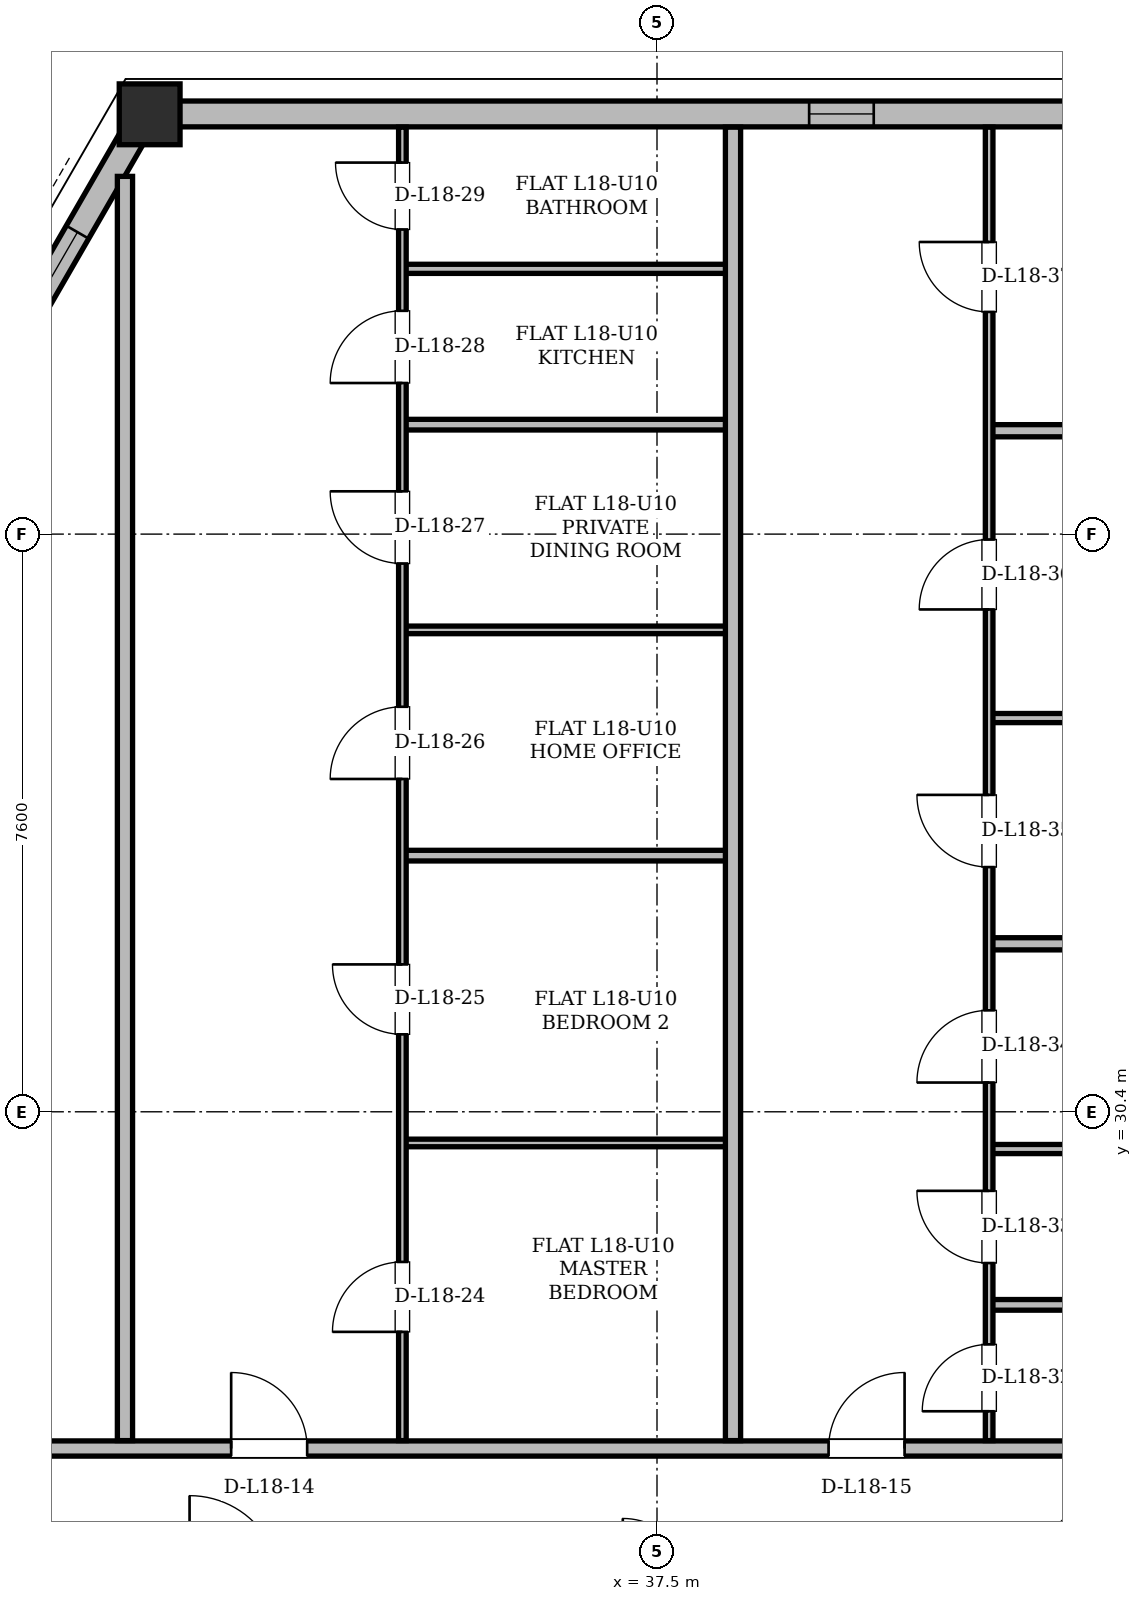
"""IFC4 building model, lengths in metres.
Left out: names, types, materials, properties, quantities, classifications, styles, units other than length and angle.
Written with IfcOpenShell. Run it as: python <this file> out.ifc"""

import sys

from ifc_helpers import new_model, si_unit, direction, frame, frame_2d, origin, origin_2d, place, context, subcontext, project, spatial, rectangle, hollow_rectangle, extrude, element, fill, save


model = new_model("IFC4")
c1 = context("Model", 3, precision=1e-05, world=origin(), true_north=direction((0.0, 1.0)))
c2 = subcontext(c1, "Body", "Model", "MODEL_VIEW")
j1 = project(units=[si_unit("LENGTHUNIT", "METRE"), si_unit("PLANEANGLEUNIT", "RADIAN")], contexts=[c1])
p1 = place(None, origin())
s1 = spatial("IfcSite", under=j1, at=p1, CompositionType="ELEMENT")
p2 = place(p1, origin())
s2 = spatial("IfcBuilding", under=s1, at=p2, CompositionType="ELEMENT")
p3 = place(p2, frame((0.0, 0.0, 70.5)))
s3 = spatial("IfcBuildingStorey", under=s2, at=p3, CompositionType="ELEMENT", Elevation=70.5)
p4 = place(p3, frame((30.773, 43.528, 0.004), z_axis=(0.028678016801, -0.002650338046, 0.999585187496), x_axis=(0.092024908784, 0.995756705307, 0.0)))
e1 = element("IfcColumn", 1, at=p4, inside=s3, PredefinedType="COLUMN", context=c2, shape_type="SweptSolid", body=[
    extrude(hollow_rectangle(XDim=0.8, YDim=0.8, WallThickness=0.065, at=origin_2d()), origin(), (0.0, 0.0, 1.0), 3.593),
])
p5 = place(p3, frame((44.227, 43.528, 0.0), z_axis=(0.0, 0.0, 1.0), x_axis=(-1.0, 0.0, 0.0)))
e2 = element("IfcWall", 2, at=p5, inside=s3, PredefinedType="SOLIDWALL", context=c2, shape_type="SweptSolid", body=[
    extrude(rectangle(XDim=13.454, YDim=0.34, at=frame_2d((6.727, 0.0))), origin(), (0.0, 0.0, 1.0), 2.494),
])
p6 = place(p5, frame((3.875, 0.0, 0.52)))
e3 = element("IfcOpeningElement", 3, at=p6, cuts=e2, PredefinedType="OPENING", context=c2, shape_type="SweptSolid", body=[
    extrude(rectangle(XDim=0.85, YDim=0.92, at=frame_2d((0.425, 0.46))), frame((0.0, 0.17, 0.0), z_axis=(0.0, -1.0, 0.0), x_axis=(1.0, 0.0, 0.0)), (0.0, 0.0, 1.0), 0.34),
])
p7 = place(p3, frame((30.773, 43.528, 0.0), z_axis=(0.0, 0.0, 1.0), x_axis=(-0.499999987774, -0.866025410843, 0.0)))
e4 = element("IfcWall", 4, at=p7, inside=s3, PredefinedType="SOLIDWALL", context=c2, shape_type="SweptSolid", body=[
    extrude(rectangle(XDim=14.976, YDim=0.34, at=frame_2d((7.488, 0.0))), origin(), (0.0, 0.0, 1.0), 2.494),
])
p8 = place(p7, frame((6.369, 0.0, 0.0)))
e5 = element("IfcOpeningElement", 5, at=p8, cuts=e4, PredefinedType="OPENING", context=c2, shape_type="SweptSolid", body=[
    extrude(rectangle(XDim=1.5, YDim=2.2, at=frame_2d((0.75, 1.1))), frame((0.0, 0.17, 0.0), z_axis=(0.0, -1.0, 0.0), x_axis=(1.0, 0.0, 0.0)), (0.0, 0.0, 1.0), 0.34),
])
p9 = place(p7, frame((3.269, 0.0, 0.85)))
e6 = element("IfcOpeningElement", 6, at=p9, cuts=e4, PredefinedType="OPENING", context=c2, shape_type="SweptSolid", body=[
    extrude(rectangle(XDim=1.2, YDim=1.48, at=frame_2d((0.6, 0.74))), frame((0.0, 0.17, 0.0), z_axis=(0.0, -1.0, 0.0), x_axis=(1.0, 0.0, 0.0)), (0.0, 0.0, 1.0), 0.34),
])
p10 = place(p7, frame((11.352, 0.0, 0.85)))
e7 = element("IfcOpeningElement", 7, at=p10, cuts=e4, PredefinedType="OPENING", context=c2, shape_type="SweptSolid", body=[
    extrude(rectangle(XDim=1.2, YDim=1.48, at=frame_2d((0.6, 0.74))), frame((0.0, 0.17, 0.0), z_axis=(0.0, -1.0, 0.0), x_axis=(1.0, 0.0, 0.0)), (0.0, 0.0, 1.0), 0.34),
])
p11 = place(p7, frame((1.796, 0.0, 0.85)))
e8 = element("IfcOpeningElement", 8, at=p11, cuts=e4, PredefinedType="OPENING", context=c2, shape_type="SweptSolid", body=[
    extrude(rectangle(XDim=1.2, YDim=1.48, at=frame_2d((0.6, 0.74))), frame((0.0, 0.17, 0.0), z_axis=(0.0, -1.0, 0.0), x_axis=(1.0, 0.0, 0.0)), (0.0, 0.0, 1.0), 0.34),
])
p12 = place(p3, frame((27.55, 25.97, 0.0), z_axis=(0.0, 0.0, 1.0), x_axis=(1.0, 0.0, 0.0)))
e9 = element("IfcWall", 9, at=p12, inside=s3, PredefinedType="PARTITIONING", context=c2, shape_type="SweptSolid", body=[
    extrude(rectangle(XDim=19.9, YDim=0.2, at=frame_2d((9.95, 0.0))), origin(), (0.0, 0.0, 1.0), 2.738),
])
p13 = place(p12, frame((0.425, 0.0, 0.0)))
e10 = element("IfcOpeningElement", 10, at=p13, cuts=e9, PredefinedType="OPENING", context=c2, shape_type="SweptSolid", body=[
    extrude(rectangle(XDim=1.0, YDim=2.18, at=frame_2d((0.5, 1.09))), frame((0.0, 0.1, 0.0), z_axis=(0.0, -1.0, 0.0), x_axis=(1.0, 0.0, 0.0)), (0.0, 0.0, 1.0), 0.2),
])
p14 = place(p12, frame((4.347, 0.0, 0.0)))
e11 = element("IfcOpeningElement", 11, at=p14, cuts=e9, PredefinedType="OPENING", context=c2, shape_type="SweptSolid", body=[
    extrude(rectangle(XDim=1.0, YDim=2.18, at=frame_2d((0.5, 1.09))), frame((0.0, 0.1, 0.0), z_axis=(0.0, -1.0, 0.0), x_axis=(1.0, 0.0, 0.0)), (0.0, 0.0, 1.0), 0.2),
])
p15 = place(p12, frame((12.208, 0.0, 0.0)))
e12 = element("IfcOpeningElement", 12, at=p15, cuts=e9, PredefinedType="OPENING", context=c2, shape_type="SweptSolid", body=[
    extrude(rectangle(XDim=1.0, YDim=2.18, at=frame_2d((0.5, 1.09))), frame((0.0, 0.1, 0.0), z_axis=(0.0, -1.0, 0.0), x_axis=(1.0, 0.0, 0.0)), (0.0, 0.0, 1.0), 0.2),
])
p16 = place(p3, frame((41.87, 27.86, 0.0), z_axis=(0.0, 0.0, 1.0), x_axis=(1.0, 0.0, 0.0)))
e13 = element("IfcWall", 13, at=p16, inside=s3, PredefinedType="PARTITIONING", context=c2, shape_type="SweptSolid", body=[
    extrude(rectangle(XDim=4.38, YDim=0.14, at=frame_2d((2.19, 0.0))), origin(), (0.0, 0.0, 1.0), 2.738),
])
p17 = place(p3, frame((41.87, 29.91, 0.0), z_axis=(0.0, 0.0, 1.0), x_axis=(1.0, 0.0, 0.0)))
e14 = element("IfcWall", 14, at=p17, inside=s3, PredefinedType="PARTITIONING", context=c2, shape_type="SweptSolid", body=[
    extrude(rectangle(XDim=4.38, YDim=0.12, at=frame_2d((2.19, 0.0))), origin(), (0.0, 0.0, 1.0), 2.738),
])
p18 = place(p3, frame((34.15, 29.99, 0.0), z_axis=(0.0, 0.0, 1.0), x_axis=(1.0, 0.0, 0.0)))
e15 = element("IfcWall", 15, at=p18, inside=s3, PredefinedType="PARTITIONING", context=c2, shape_type="SweptSolid", body=[
    extrude(rectangle(XDim=4.4, YDim=0.1, at=frame_2d((2.2, 0.0))), origin(), (0.0, 0.0, 1.0), 3.36),
])
p19 = place(p3, frame((41.87, 32.61, 0.0), z_axis=(0.0, 0.0, 1.0), x_axis=(1.0, 0.0, 0.0)))
e16 = element("IfcWall", 16, at=p19, inside=s3, PredefinedType="PARTITIONING", context=c2, shape_type="SweptSolid", body=[
    extrude(rectangle(XDim=4.38, YDim=0.16, at=frame_2d((2.19, 0.0))), origin(), (0.0, 0.0, 1.0), 2.738),
])
p20 = place(p3, frame((34.15, 33.77, 0.0), z_axis=(0.0, 0.0, 1.0), x_axis=(1.0, 0.0, 0.0)))
e17 = element("IfcWall", 17, at=p20, inside=s3, PredefinedType="PARTITIONING", context=c2, shape_type="SweptSolid", body=[
    extrude(rectangle(XDim=4.4, YDim=0.14, at=frame_2d((2.2, 0.0))), origin(), (0.0, 0.0, 1.0), 3.36),
])
p21 = place(p3, frame((41.87, 35.58, 0.0), z_axis=(0.0, 0.0, 1.0), x_axis=(1.0, 0.0, 0.0)))
e18 = element("IfcWall", 18, at=p21, inside=s3, PredefinedType="PARTITIONING", context=c2, shape_type="SweptSolid", body=[
    extrude(rectangle(XDim=4.38, YDim=0.12, at=frame_2d((2.19, 0.0))), origin(), (0.0, 0.0, 1.0), 2.738),
])
p22 = place(p3, frame((34.15, 36.74, 0.0), z_axis=(0.0, 0.0, 1.0), x_axis=(1.0, 0.0, 0.0)))
e19 = element("IfcWall", 19, at=p22, inside=s3, PredefinedType="PARTITIONING", context=c2, shape_type="SweptSolid", body=[
    extrude(rectangle(XDim=4.4, YDim=0.1, at=frame_2d((2.2, 0.0))), origin(), (0.0, 0.0, 1.0), 3.36),
])
p23 = place(p3, frame((41.87, 39.36, 0.0), z_axis=(0.0, 0.0, 1.0), x_axis=(1.0, 0.0, 0.0)))
e20 = element("IfcWall", 20, at=p23, inside=s3, PredefinedType="PARTITIONING", context=c2, shape_type="SweptSolid", body=[
    extrude(rectangle(XDim=4.38, YDim=0.16, at=frame_2d((2.19, 0.0))), origin(), (0.0, 0.0, 1.0), 2.738),
])
p24 = place(p3, frame((34.15, 39.44, 0.0), z_axis=(0.0, 0.0, 1.0), x_axis=(1.0, 0.0, 0.0)))
e21 = element("IfcWall", 21, at=p24, inside=s3, PredefinedType="PARTITIONING", context=c2, shape_type="SweptSolid", body=[
    extrude(rectangle(XDim=4.4, YDim=0.14, at=frame_2d((2.2, 0.0))), origin(), (0.0, 0.0, 1.0), 3.36),
])
p25 = place(p3, frame((34.15, 41.49, 0.0), z_axis=(0.0, 0.0, 1.0), x_axis=(1.0, 0.0, 0.0)))
e22 = element("IfcWall", 22, at=p25, inside=s3, PredefinedType="PARTITIONING", context=c2, shape_type="SweptSolid", body=[
    extrude(rectangle(XDim=4.4, YDim=0.12, at=frame_2d((2.2, 0.0))), origin(), (0.0, 0.0, 1.0), 3.36),
])
p26 = place(p3, frame((30.5, 26.074, 0.0), z_axis=(0.0, 0.0, 1.0), x_axis=(0.0, 1.0, 0.0)))
e23 = element("IfcWall", 23, at=p26, inside=s3, PredefinedType="PARTITIONING", context=c2, shape_type="SweptSolid", body=[
    extrude(rectangle(XDim=16.632, YDim=0.2, at=frame_2d((8.316, 0.0))), origin(), (0.0, 0.0, 1.0), 2.494),
])
p27 = place(p3, frame((34.15, 26.074, 0.0), z_axis=(0.0, 0.0, 1.0), x_axis=(0.0, 1.0, 0.0)))
e24 = element("IfcWall", 24, at=p27, inside=s3, PredefinedType="PARTITIONING", context=c2, shape_type="SweptSolid", body=[
    extrude(rectangle(XDim=17.28, YDim=0.1, at=frame_2d((8.64, 0.0))), origin(), (0.0, 0.0, 1.0), 3.36),
])
p28 = place(p27, frame((1.431, 0.0, 0.0)))
e25 = element("IfcOpeningElement", 25, at=p28, cuts=e24, PredefinedType="OPENING", context=c2, shape_type="SweptSolid", body=[
    extrude(rectangle(XDim=0.92, YDim=2.12, at=frame_2d((0.46, 1.06))), frame((0.0, 0.05, 0.0), z_axis=(0.0, -1.0, 0.0), x_axis=(1.0, 0.0, 0.0)), (0.0, 0.0, 1.0), 0.1),
])
p29 = place(p27, frame((5.345, 0.0, 0.0)))
e26 = element("IfcOpeningElement", 26, at=p29, cuts=e24, PredefinedType="OPENING", context=c2, shape_type="SweptSolid", body=[
    extrude(rectangle(XDim=0.92, YDim=2.12, at=frame_2d((0.46, 1.06))), frame((0.0, 0.05, 0.0), z_axis=(0.0, -1.0, 0.0), x_axis=(1.0, 0.0, 0.0)), (0.0, 0.0, 1.0), 0.1),
])
p30 = place(p27, frame((8.705, 0.0, 0.0)))
e27 = element("IfcOpeningElement", 27, at=p30, cuts=e24, PredefinedType="OPENING", context=c2, shape_type="SweptSolid", body=[
    extrude(rectangle(XDim=0.95, YDim=2.1, at=frame_2d((0.475, 1.05))), frame((0.0, 0.05, 0.0), z_axis=(0.0, -1.0, 0.0), x_axis=(1.0, 0.0, 0.0)), (0.0, 0.0, 1.0), 0.1),
])
p31 = place(p27, frame((11.539, 0.0, 0.0)))
e28 = element("IfcOpeningElement", 28, at=p31, cuts=e24, PredefinedType="OPENING", context=c2, shape_type="SweptSolid", body=[
    extrude(rectangle(XDim=0.95, YDim=2.1, at=frame_2d((0.475, 1.05))), frame((0.0, 0.05, 0.0), z_axis=(0.0, -1.0, 0.0), x_axis=(1.0, 0.0, 0.0)), (0.0, 0.0, 1.0), 0.1),
])
p32 = place(p27, frame((13.914, 0.0, 0.0)))
e29 = element("IfcOpeningElement", 29, at=p32, cuts=e24, PredefinedType="OPENING", context=c2, shape_type="SweptSolid", body=[
    extrude(rectangle(XDim=0.95, YDim=2.1, at=frame_2d((0.475, 1.05))), frame((0.0, 0.05, 0.0), z_axis=(0.0, -1.0, 0.0), x_axis=(1.0, 0.0, 0.0)), (0.0, 0.0, 1.0), 0.1),
])
p33 = place(p27, frame((15.934, 0.0, 0.0)))
e30 = element("IfcOpeningElement", 30, at=p33, cuts=e24, PredefinedType="OPENING", context=c2, shape_type="SweptSolid", body=[
    extrude(rectangle(XDim=0.88, YDim=2.08, at=frame_2d((0.44, 1.04))), frame((0.0, 0.05, 0.0), z_axis=(0.0, -1.0, 0.0), x_axis=(1.0, 0.0, 0.0)), (0.0, 0.0, 1.0), 0.1),
])
p34 = place(p3, frame((38.5, 26.074, 0.0), z_axis=(0.0, 0.0, 1.0), x_axis=(0.0, 1.0, 0.0)))
e31 = element("IfcWall", 31, at=p34, inside=s3, PredefinedType="PARTITIONING", context=c2, shape_type="SweptSolid", body=[
    extrude(rectangle(XDim=17.28, YDim=0.2, at=frame_2d((8.64, 0.0))), origin(), (0.0, 0.0, 1.0), 3.36),
])
p35 = place(p3, frame((41.87, 26.074, 0.0), z_axis=(0.0, 0.0, 1.0), x_axis=(0.0, 1.0, 0.0)))
e32 = element("IfcWall", 32, at=p35, inside=s3, PredefinedType="PARTITIONING", context=c2, shape_type="SweptSolid", body=[
    extrude(rectangle(XDim=17.28, YDim=0.1, at=frame_2d((8.64, 0.0))), origin(), (0.0, 0.0, 1.0), 3.36),
])
p36 = place(p35, frame((0.386, 0.0, 0.0)))
e33 = element("IfcOpeningElement", 33, at=p36, cuts=e32, PredefinedType="OPENING", context=c2, shape_type="SweptSolid", body=[
    extrude(rectangle(XDim=0.88, YDim=2.08, at=frame_2d((0.44, 1.04))), frame((0.0, 0.05, 0.0), z_axis=(0.0, -1.0, 0.0), x_axis=(1.0, 0.0, 0.0)), (0.0, 0.0, 1.0), 0.1),
])
p37 = place(p35, frame((2.336, 0.0, 0.0)))
e34 = element("IfcOpeningElement", 34, at=p37, cuts=e32, PredefinedType="OPENING", context=c2, shape_type="SweptSolid", body=[
    extrude(rectangle(XDim=0.95, YDim=2.1, at=frame_2d((0.475, 1.05))), frame((0.0, 0.05, 0.0), z_axis=(0.0, -1.0, 0.0), x_axis=(1.0, 0.0, 0.0)), (0.0, 0.0, 1.0), 0.1),
])
p38 = place(p35, frame((4.711, 0.0, 0.0)))
e35 = element("IfcOpeningElement", 35, at=p38, cuts=e32, PredefinedType="OPENING", context=c2, shape_type="SweptSolid", body=[
    extrude(rectangle(XDim=0.95, YDim=2.1, at=frame_2d((0.475, 1.05))), frame((0.0, 0.05, 0.0), z_axis=(0.0, -1.0, 0.0), x_axis=(1.0, 0.0, 0.0)), (0.0, 0.0, 1.0), 0.1),
])
p39 = place(p35, frame((7.545, 0.0, 0.0)))
e36 = element("IfcOpeningElement", 36, at=p39, cuts=e32, PredefinedType="OPENING", context=c2, shape_type="SweptSolid", body=[
    extrude(rectangle(XDim=0.95, YDim=2.1, at=frame_2d((0.475, 1.05))), frame((0.0, 0.05, 0.0), z_axis=(0.0, -1.0, 0.0), x_axis=(1.0, 0.0, 0.0)), (0.0, 0.0, 1.0), 0.1),
])
p40 = place(p35, frame((10.935, 0.0, 0.0)))
e37 = element("IfcOpeningElement", 37, at=p40, cuts=e32, PredefinedType="OPENING", context=c2, shape_type="SweptSolid", body=[
    extrude(rectangle(XDim=0.92, YDim=2.12, at=frame_2d((0.46, 1.06))), frame((0.0, 0.05, 0.0), z_axis=(0.0, -1.0, 0.0), x_axis=(1.0, 0.0, 0.0)), (0.0, 0.0, 1.0), 0.1),
])
p41 = place(p35, frame((14.849, 0.0, 0.0)))
e38 = element("IfcOpeningElement", 38, at=p41, cuts=e32, PredefinedType="OPENING", context=c2, shape_type="SweptSolid", body=[
    extrude(rectangle(XDim=0.92, YDim=2.12, at=frame_2d((0.46, 1.06))), frame((0.0, 0.05, 0.0), z_axis=(0.0, -1.0, 0.0), x_axis=(1.0, 0.0, 0.0)), (0.0, 0.0, 1.0), 0.1),
])
p42 = place(p11, origin())
e39 = element("IfcWindow", 39, at=p42, inside=s3, PartitioningType="SINGLE_PANEL", PredefinedType="WINDOW", context=c2, shape_type="SweptSolid", body=[
    extrude(rectangle(XDim=1.2, YDim=1.48, at=frame_2d((0.6, 0.74))), frame((0.0, 0.03, 0.0), z_axis=(0.0, -1.0, 0.0), x_axis=(1.0, 0.0, 0.0)), (0.0, 0.0, 1.0), 0.06),
])
fill(e8, e39)
p43 = place(p6, origin())
e40 = element("IfcWindow", 40, at=p43, inside=s3, PartitioningType="SINGLE_PANEL", PredefinedType="WINDOW", context=c2, shape_type="SweptSolid", body=[
    extrude(rectangle(XDim=0.85, YDim=0.92, at=frame_2d((0.425, 0.46))), frame((0.0, 0.03, 0.0), z_axis=(0.0, -1.0, 0.0), x_axis=(1.0, 0.0, 0.0)), (0.0, 0.0, 1.0), 0.06),
])
fill(e3, e40)
p44 = place(p14, origin())
e41 = element("IfcDoor", 41, at=p44, inside=s3, OperationType="SINGLE_SWING_LEFT", PredefinedType="DOOR", context=c2, shape_type="SweptSolid", body=[
    extrude(rectangle(XDim=1.0, YDim=2.18, at=frame_2d((0.5, 1.09))), frame((0.0, 0.025, 0.0), z_axis=(0.0, -1.0, 0.0), x_axis=(1.0, 0.0, 0.0)), (0.0, 0.0, 1.0), 0.05),
])
fill(e11, e41)
p45 = place(p15, origin())
e42 = element("IfcDoor", 42, at=p45, inside=s3, OperationType="SINGLE_SWING_RIGHT", PredefinedType="DOOR", context=c2, shape_type="SweptSolid", body=[
    extrude(rectangle(XDim=1.0, YDim=2.18, at=frame_2d((0.5, 1.09))), frame((0.0, 0.025, 0.0), z_axis=(0.0, -1.0, 0.0), x_axis=(1.0, 0.0, 0.0)), (0.0, 0.0, 1.0), 0.05),
])
fill(e12, e42)
p46 = place(p28, origin())
e43 = element("IfcDoor", 43, at=p46, inside=s3, OperationType="SINGLE_SWING_LEFT", PredefinedType="DOOR", context=c2, shape_type="SweptSolid", body=[
    extrude(rectangle(XDim=0.92, YDim=2.12, at=frame_2d((0.46, 1.06))), frame((0.0, 0.025, 0.0), z_axis=(0.0, -1.0, 0.0), x_axis=(1.0, 0.0, 0.0)), (0.0, 0.0, 1.0), 0.05),
])
fill(e25, e43)
p47 = place(p29, origin())
e44 = element("IfcDoor", 44, at=p47, inside=s3, OperationType="SINGLE_SWING_RIGHT", PredefinedType="DOOR", context=c2, shape_type="SweptSolid", body=[
    extrude(rectangle(XDim=0.92, YDim=2.12, at=frame_2d((0.46, 1.06))), frame((0.0, 0.025, 0.0), z_axis=(0.0, -1.0, 0.0), x_axis=(1.0, 0.0, 0.0)), (0.0, 0.0, 1.0), 0.05),
])
fill(e26, e44)
p48 = place(p30, origin())
e45 = element("IfcDoor", 45, at=p48, inside=s3, OperationType="SINGLE_SWING_LEFT", PredefinedType="DOOR", context=c2, shape_type="SweptSolid", body=[
    extrude(rectangle(XDim=0.95, YDim=2.1, at=frame_2d((0.475, 1.05))), frame((0.0, 0.025, 0.0), z_axis=(0.0, -1.0, 0.0), x_axis=(1.0, 0.0, 0.0)), (0.0, 0.0, 1.0), 0.05),
])
fill(e27, e45)
p49 = place(p31, origin())
e46 = element("IfcDoor", 46, at=p49, inside=s3, OperationType="SINGLE_SWING_RIGHT", PredefinedType="DOOR", context=c2, shape_type="SweptSolid", body=[
    extrude(rectangle(XDim=0.95, YDim=2.1, at=frame_2d((0.475, 1.05))), frame((0.0, 0.025, 0.0), z_axis=(0.0, -1.0, 0.0), x_axis=(1.0, 0.0, 0.0)), (0.0, 0.0, 1.0), 0.05),
])
fill(e28, e46)
p50 = place(p32, origin())
e47 = element("IfcDoor", 47, at=p50, inside=s3, OperationType="SINGLE_SWING_LEFT", PredefinedType="DOOR", context=c2, shape_type="SweptSolid", body=[
    extrude(rectangle(XDim=0.95, YDim=2.1, at=frame_2d((0.475, 1.05))), frame((0.0, 0.025, 0.0), z_axis=(0.0, -1.0, 0.0), x_axis=(1.0, 0.0, 0.0)), (0.0, 0.0, 1.0), 0.05),
])
fill(e29, e47)
p51 = place(p33, origin())
e48 = element("IfcDoor", 48, at=p51, inside=s3, OperationType="SINGLE_SWING_RIGHT", PredefinedType="DOOR", context=c2, shape_type="SweptSolid", body=[
    extrude(rectangle(XDim=0.88, YDim=2.08, at=frame_2d((0.44, 1.04))), frame((0.0, 0.025, 0.0), z_axis=(0.0, -1.0, 0.0), x_axis=(1.0, 0.0, 0.0)), (0.0, 0.0, 1.0), 0.05),
])
fill(e30, e48)
p52 = place(p36, origin())
e49 = element("IfcDoor", 49, at=p52, inside=s3, OperationType="SINGLE_SWING_LEFT", PredefinedType="DOOR", context=c2, shape_type="SweptSolid", body=[
    extrude(rectangle(XDim=0.88, YDim=2.08, at=frame_2d((0.44, 1.04))), frame((0.0, 0.025, 0.0), z_axis=(0.0, -1.0, 0.0), x_axis=(1.0, 0.0, 0.0)), (0.0, 0.0, 1.0), 0.05),
])
fill(e33, e49)
p53 = place(p37, origin())
e50 = element("IfcDoor", 50, at=p53, inside=s3, OperationType="SINGLE_SWING_RIGHT", PredefinedType="DOOR", context=c2, shape_type="SweptSolid", body=[
    extrude(rectangle(XDim=0.95, YDim=2.1, at=frame_2d((0.475, 1.05))), frame((0.0, 0.025, 0.0), z_axis=(0.0, -1.0, 0.0), x_axis=(1.0, 0.0, 0.0)), (0.0, 0.0, 1.0), 0.05),
])
fill(e34, e50)
p54 = place(p38, origin())
e51 = element("IfcDoor", 51, at=p54, inside=s3, OperationType="SINGLE_SWING_LEFT", PredefinedType="DOOR", context=c2, shape_type="SweptSolid", body=[
    extrude(rectangle(XDim=0.95, YDim=2.1, at=frame_2d((0.475, 1.05))), frame((0.0, 0.025, 0.0), z_axis=(0.0, -1.0, 0.0), x_axis=(1.0, 0.0, 0.0)), (0.0, 0.0, 1.0), 0.05),
])
fill(e35, e51)
p55 = place(p39, origin())
e52 = element("IfcDoor", 52, at=p55, inside=s3, OperationType="SINGLE_SWING_RIGHT", PredefinedType="DOOR", context=c2, shape_type="SweptSolid", body=[
    extrude(rectangle(XDim=0.95, YDim=2.1, at=frame_2d((0.475, 1.05))), frame((0.0, 0.025, 0.0), z_axis=(0.0, -1.0, 0.0), x_axis=(1.0, 0.0, 0.0)), (0.0, 0.0, 1.0), 0.05),
])
fill(e36, e52)
p56 = place(p40, origin())
e53 = element("IfcDoor", 53, at=p56, inside=s3, OperationType="SINGLE_SWING_LEFT", PredefinedType="DOOR", context=c2, shape_type="SweptSolid", body=[
    extrude(rectangle(XDim=0.92, YDim=2.12, at=frame_2d((0.46, 1.06))), frame((0.0, 0.025, 0.0), z_axis=(0.0, -1.0, 0.0), x_axis=(1.0, 0.0, 0.0)), (0.0, 0.0, 1.0), 0.05),
])
fill(e37, e53)
p57 = place(p41, origin())
e54 = element("IfcDoor", 54, at=p57, inside=s3, OperationType="SINGLE_SWING_RIGHT", PredefinedType="DOOR", context=c2, shape_type="SweptSolid", body=[
    extrude(rectangle(XDim=0.92, YDim=2.12, at=frame_2d((0.46, 1.06))), frame((0.0, 0.025, 0.0), z_axis=(0.0, -1.0, 0.0), x_axis=(1.0, 0.0, 0.0)), (0.0, 0.0, 1.0), 0.05),
])
fill(e38, e54)
save(model, sys.argv[1])
